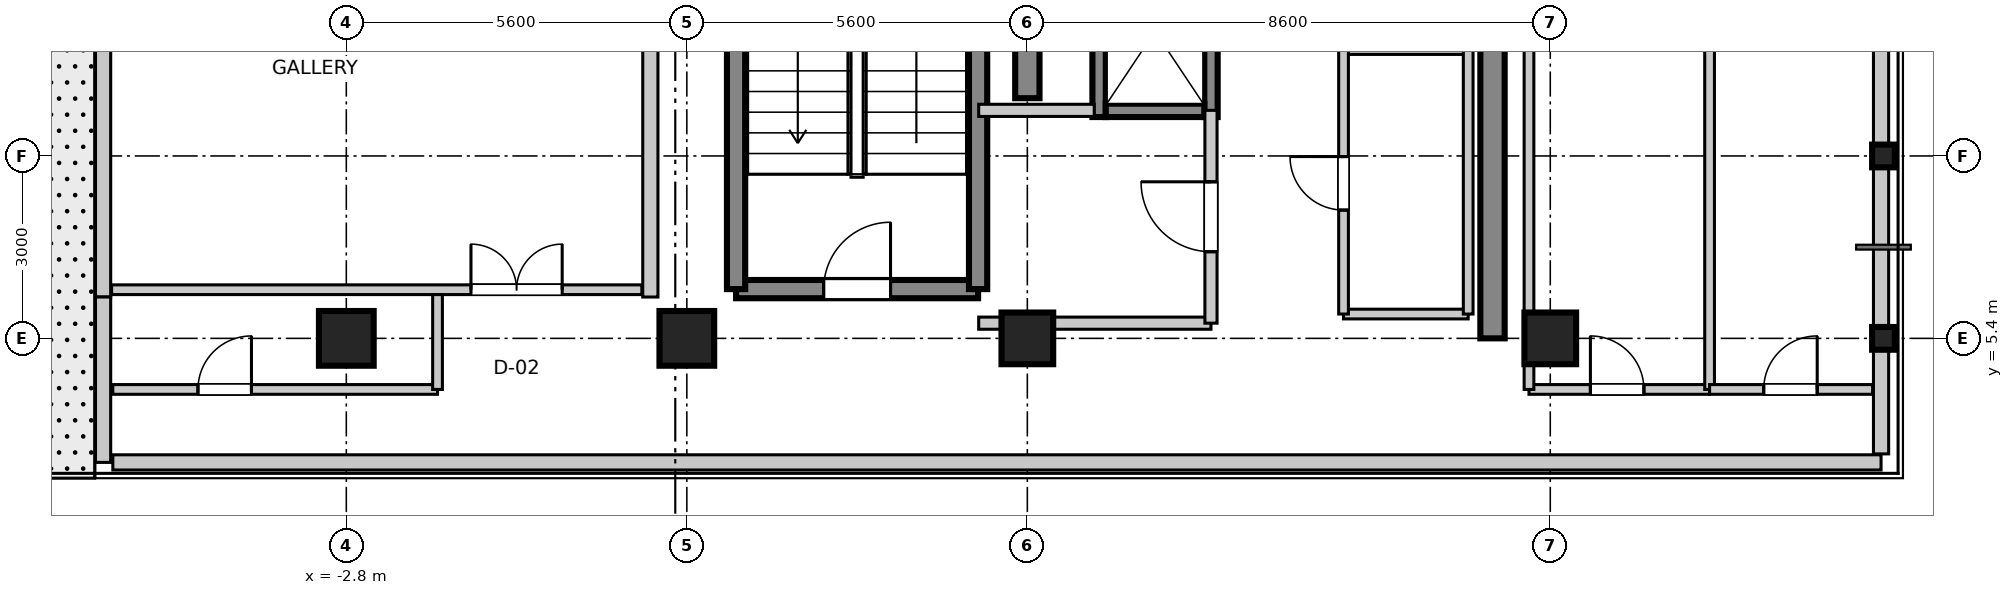
"""IFC4 building model, lengths in metres.
Left out: names, types, materials, properties, quantities, classifications, styles, units other than length and angle.
Written with IfcOpenShell. Run it as: python <this file> out.ifc"""

import sys

from ifc_helpers import new_model, si_unit, direction, frame, frame_2d, origin, origin_2d, place, context, subcontext, project, spatial, rectangle, i_section, extrude, source, transform, mapped, element, fill, save


model = new_model("IFC4")
c1 = context("Model", 3, precision=1e-05, world=origin(), true_north=direction((0.0, 1.0)))
c2 = subcontext(c1, "Body", "Model", "MODEL_VIEW")
j1 = project(units=[si_unit("LENGTHUNIT", "METRE"), si_unit("PLANEANGLEUNIT", "RADIAN")], contexts=[c1])
p1 = place(None, origin())
s1 = spatial("IfcSite", under=j1, at=p1, CompositionType="ELEMENT")
p2 = place(p1, origin())
s2 = spatial("IfcBuilding", under=s1, at=p2, CompositionType="ELEMENT")
p3 = place(p2, frame((0.0, 0.0, 300.35)))
s3 = spatial("IfcBuildingStorey", under=s2, at=p3, CompositionType="ELEMENT", Elevation=300.35)
m1 = source(origin(), c2, "Body", "SweptSolid", [
    extrude(rectangle(XDim=0.9, YDim=0.9, at=origin_2d()), origin(), (0.0, 0.0, 1.0), 3.805),
])
for number, where, z_axis, x_axis in (
    (1, (-2.8, 5.4, 0.0), (0.0, 0.0, 1.0), (1.0, 0.0, 0.0)),
    (2, (2.8, 5.4, 0.0), (0.0, 0.0, 1.0), (1.0, 0.0, 0.0)),
):
    element("IfcColumn", number, at=place(p3, frame(where, z_axis=z_axis, x_axis=x_axis)), inside=s3, PredefinedType="COLUMN", context=c2, shape_type="MappedRepresentation", body=[
        mapped(m1, transform((0.0, 0.0, 0.0), scale=1.0)),
    ])
m2 = source(origin(), c2, "Body", "SweptSolid", [
    extrude(rectangle(XDim=0.85, YDim=0.85, at=origin_2d()), origin(), (0.0, 0.0, 1.0), 3.805),
])
for number, where, z_axis, x_axis in (
    (3, (8.4, 5.4, 0.0), (0.0, 0.0, 1.0), (1.0, 0.0, 0.0)),
    (4, (17.0, 5.4, 0.0), (0.0, 0.0, 1.0), (1.0, 0.0, 0.0)),
):
    element("IfcColumn", number, at=place(p3, frame(where, z_axis=z_axis, x_axis=x_axis)), inside=s3, PredefinedType="PILASTER", context=c2, shape_type="MappedRepresentation", body=[
        mapped(m2, transform((0.0, 0.0, 0.0), scale=1.0)),
    ])
m3 = source(origin(), c2, "Body", "SweptSolid", [
    extrude(i_section(OverallWidth=0.374, OverallDepth=0.374, WebThickness=0.014, FlangeThickness=0.023, at=origin_2d()), origin(), (0.0, 0.0, 1.0), 3.805),
])
for number, where, z_axis, x_axis in (
    (5, (22.48, 5.4, 0.0), (0.0, 0.0, 1.0), (1.0, 0.0, 0.0)),
    (6, (22.48, 8.4, 0.0), (0.0, 0.0, 1.0), (1.0, 0.0, 0.0)),
):
    element("IfcColumn", number, at=place(p3, frame(where, z_axis=z_axis, x_axis=x_axis)), inside=s3, PredefinedType="COLUMN", context=c2, shape_type="MappedRepresentation", body=[
        mapped(m3, transform((0.0, 0.0, 0.0), scale=1.0)),
    ])
m4 = source(origin(), c2, "Body", "SweptSolid", [
    extrude(rectangle(XDim=7.65, YDim=0.4, at=frame_2d((3.825, 0.0))), origin(), (0.0, 0.0, 1.0), 3.55),
])
p4 = place(p3, frame((8.4, 9.35, 0.0), z_axis=(0.0, 0.0, 1.0), x_axis=(0.0, 1.0, 0.0)))
e7 = element("IfcWall", 7, at=p4, inside=s3, PredefinedType="SHEAR", context=c2, shape_type="MappedRepresentation", body=[
    mapped(m4, transform((0.0, 0.0, 0.0), scale=1.0)),
])
m5 = source(origin(), c2, "Body", "SweptSolid", [
    extrude(rectangle(XDim=11.6, YDim=0.4, at=frame_2d((5.8, 0.0))), origin(), (0.0, 0.0, 1.0), 3.55),
])
p5 = place(p3, frame((16.05, 5.4, 0.0), z_axis=(0.0, 0.0, 1.0), x_axis=(0.0, 1.0, 0.0)))
e8 = element("IfcWall", 8, at=p5, inside=s3, PredefinedType="SHEAR", context=c2, shape_type="MappedRepresentation", body=[
    mapped(m5, transform((0.0, 0.0, 0.0), scale=1.0)),
])
m6 = source(origin(), c2, "Body", "SweptSolid", [
    extrude(rectangle(XDim=3.98, YDim=0.3, at=frame_2d((1.99, 0.0))), origin(), (0.0, 0.0, 1.0), 3.55),
])
p6 = place(p3, frame((3.61, 6.21, 0.0), z_axis=(0.0, 0.0, 1.0), x_axis=(1.0, 0.0, 0.0)))
e9 = element("IfcWall", 9, at=p6, inside=s3, PredefinedType="SHEAR", context=c2, shape_type="MappedRepresentation", body=[
    mapped(m6, transform((0.0, 0.0, 0.0), scale=1.0)),
])
p7 = place(p6, frame((1.44, 0.0, 0.0)))
e10 = element("IfcOpeningElement", 10, at=p7, cuts=e9, PredefinedType="OPENING", context=c2, shape_type="SweptSolid", body=[
    extrude(rectangle(XDim=1.1, YDim=2.15, at=frame_2d((0.55, 1.075))), frame((0.0, 0.16, 0.0), z_axis=(0.0, -1.0, 0.0), x_axis=(1.0, 0.0, 0.0)), (0.0, 0.0, 1.0), 0.32),
])
m7 = source(origin(), c2, "Body", "SweptSolid", [
    extrude(rectangle(XDim=9.38, YDim=0.3, at=frame_2d((4.69, 0.0))), origin(), (0.0, 0.0, 1.0), 3.55),
])
for number, where, z_axis, x_axis in (
    (11, (3.61, 6.21, 0.0), (0.0, 0.0, 1.0), (0.0, 1.0, 0.0)),
    (12, (7.59, 6.21, 0.0), (0.0, 0.0, 1.0), (0.0, 1.0, 0.0)),
):
    element("IfcWall", number, at=place(p3, frame(where, z_axis=z_axis, x_axis=x_axis)), inside=s3, PredefinedType="SHEAR", context=c2, shape_type="MappedRepresentation", body=[
        mapped(m7, transform((0.0, 0.0, 0.0), scale=1.0)),
    ])
m8 = source(origin(), c2, "Body", "SweptSolid", [
    extrude(rectangle(XDim=2.82, YDim=0.22, at=frame_2d((1.41, 0.0))), origin(), (0.0, 0.0, 1.0), 3.55),
])
for number, where, z_axis, x_axis in (
    (13, (9.58, 9.04, 0.0), (0.0, 0.0, 1.0), (0.0, 1.0, 0.0)),
    (14, (11.42, 9.04, 0.0), (0.0, 0.0, 1.0), (0.0, 1.0, 0.0)),
):
    element("IfcWall", number, at=place(p3, frame(where, z_axis=z_axis, x_axis=x_axis)), inside=s3, PredefinedType="SHEAR", context=c2, shape_type="MappedRepresentation", body=[
        mapped(m8, transform((0.0, 0.0, 0.0), scale=1.0)),
    ])
m9 = source(origin(), c2, "Body", "SweptSolid", [
    extrude(rectangle(XDim=1.62, YDim=0.22, at=frame_2d((0.81, 0.0))), origin(), (0.0, 0.0, 1.0), 3.55),
])
p8 = place(p3, frame((9.69, 9.15, 0.0), z_axis=(0.0, 0.0, 1.0), x_axis=(1.0, 0.0, 0.0)))
e15 = element("IfcWall", 15, at=p8, inside=s3, PredefinedType="SHEAR", context=c2, shape_type="MappedRepresentation", body=[
    mapped(m9, transform((0.0, 0.0, 0.0), scale=1.0)),
])
m10 = source(origin(), c2, "Body", "SweptSolid", [
    extrude(rectangle(XDim=8.84, YDim=0.25, at=frame_2d((4.42, 0.0))), origin(), (0.0, 0.0, 1.0), 2.99),
])
for number, where, z_axis, x_axis in (
    (16, (-6.8, 6.08, 0.0), (0.0, 0.0, 1.0), (0.0, 1.0, 0.0)),
    (17, (2.2, 6.08, 0.0), (0.0, 0.0, 1.0), (0.0, 1.0, 0.0)),
):
    element("IfcWall", number, at=place(p3, frame(where, z_axis=z_axis, x_axis=x_axis)), inside=s3, PredefinedType="STANDARD", context=c2, shape_type="MappedRepresentation", body=[
        mapped(m10, transform((0.0, 0.0, 0.0), scale=1.0)),
    ])
m11 = source(origin(), c2, "Body", "SweptSolid", [
    extrude(rectangle(XDim=3.82, YDim=0.2, at=frame_2d((1.91, 0.0))), origin(), (0.0, 0.0, 1.0), 2.89),
])
p9 = place(p3, frame((7.6, 5.65, 0.0), z_axis=(0.0, 0.0, 1.0), x_axis=(1.0, 0.0, 0.0)))
e18 = element("IfcWall", 18, at=p9, inside=s3, PredefinedType="PARTITIONING", context=c2, shape_type="MappedRepresentation", body=[
    mapped(m11, transform((0.0, 0.0, 0.0), scale=1.0)),
])
m12 = source(origin(), c2, "Body", "SweptSolid", [
    extrude(rectangle(XDim=1.9, YDim=0.2, at=frame_2d((0.95, 0.0))), origin(), (0.0, 0.0, 1.0), 2.89),
])
p10 = place(p3, frame((7.6, 9.15, 0.0), z_axis=(0.0, 0.0, 1.0), x_axis=(1.0, 0.0, 0.0)))
e19 = element("IfcWall", 19, at=p10, inside=s3, PredefinedType="PARTITIONING", context=c2, shape_type="MappedRepresentation", body=[
    mapped(m12, transform((0.0, 0.0, 0.0), scale=1.0)),
])
m13 = source(origin(), c2, "Body", "SweptSolid", [
    extrude(rectangle(XDim=3.5, YDim=0.2, at=frame_2d((1.75, 0.0))), origin(), (0.0, 0.0, 1.0), 2.89),
])
p11 = place(p3, frame((11.42, 5.65, 0.0), z_axis=(0.0, 0.0, 1.0), x_axis=(0.0, 1.0, 0.0)))
e20 = element("IfcWall", 20, at=p11, inside=s3, PredefinedType="PARTITIONING", context=c2, shape_type="MappedRepresentation", body=[
    mapped(m13, transform((0.0, 0.0, 0.0), scale=1.0)),
])
p12 = place(p11, frame((1.175, 0.0, 0.0)))
e21 = element("IfcOpeningElement", 21, at=p12, cuts=e20, PredefinedType="OPENING", context=c2, shape_type="SweptSolid", body=[
    extrude(rectangle(XDim=1.15, YDim=2.15, at=frame_2d((0.575, 1.075))), frame((0.0, 0.11, 0.0), z_axis=(0.0, -1.0, 0.0), x_axis=(1.0, 0.0, 0.0)), (0.0, 0.0, 1.0), 0.22),
])
m14 = source(origin(), c2, "Body", "SweptSolid", [
    extrude(rectangle(XDim=29.08, YDim=0.25, at=frame_2d((14.54, 0.0))), origin(), (0.0, 0.0, 1.0), 2.89),
])
p13 = place(p3, frame((-6.64, 3.36, 0.0), z_axis=(0.0, 0.0, 1.0), x_axis=(1.0, 0.0, 0.0)))
e22 = element("IfcWall", 22, at=p13, inside=s3, PredefinedType="STANDARD", context=c2, shape_type="MappedRepresentation", body=[
    mapped(m14, transform((0.0, 0.0, 0.0), scale=1.0)),
])
m15 = source(origin(), c2, "Body", "SweptSolid", [
    extrude(rectangle(XDim=2.72, YDim=0.25, at=frame_2d((1.36, 0.0))), origin(), (0.0, 0.0, 1.0), 2.89),
])
p14 = place(p3, frame((-6.8, 3.36, 0.0), z_axis=(0.0, 0.0, 1.0), x_axis=(0.0, 1.0, 0.0)))
e23 = element("IfcWall", 23, at=p14, inside=s3, PredefinedType="STANDARD", context=c2, shape_type="MappedRepresentation", body=[
    mapped(m15, transform((0.0, 0.0, 0.0), scale=1.0)),
])
m16 = source(origin(), c2, "Body", "SweptSolid", [
    extrude(rectangle(XDim=16.12, YDim=0.25, at=frame_2d((8.06, 0.0))), origin(), (0.0, 0.0, 1.0), 2.89),
])
p15 = place(p3, frame((22.44, 3.5, 0.0), z_axis=(0.0, 0.0, 1.0), x_axis=(0.0, 1.0, 0.0)))
e24 = element("IfcWall", 24, at=p15, inside=s3, PredefinedType="STANDARD", context=c2, shape_type="MappedRepresentation", body=[
    mapped(m16, transform((0.0, 0.0, 0.0), scale=1.0)),
])
m17 = source(origin(), c2, "Body", "SweptSolid", [
    extrude(rectangle(XDim=2.05, YDim=0.16, at=frame_2d((1.025, 0.0))), origin(), (0.0, 0.0, 1.0), 2.89),
])
for number, where, z_axis, x_axis in (
    (25, (13.6, 5.8, 0.0), (0.0, 0.0, 1.0), (1.0, 0.0, 0.0)),
    (26, (13.6, 10.15, 0.0), (0.0, 0.0, 1.0), (1.0, 0.0, 0.0)),
):
    element("IfcWall", number, at=place(p3, frame(where, z_axis=z_axis, x_axis=x_axis)), inside=s3, PredefinedType="PARTITIONING", context=c2, shape_type="MappedRepresentation", body=[
        mapped(m17, transform((0.0, 0.0, 0.0), scale=1.0)),
    ])
m18 = source(origin(), c2, "Body", "SweptSolid", [
    extrude(rectangle(XDim=4.35, YDim=0.16, at=frame_2d((2.175, 0.0))), origin(), (0.0, 0.0, 1.0), 2.89),
])
p16 = place(p3, frame((13.6, 5.8, 0.0), z_axis=(0.0, 0.0, 1.0), x_axis=(0.0, 1.0, 0.0)))
e27 = element("IfcWall", 27, at=p16, inside=s3, PredefinedType="PARTITIONING", context=c2, shape_type="MappedRepresentation", body=[
    mapped(m18, transform((0.0, 0.0, 0.0), scale=1.0)),
])
p17 = place(p16, frame((1.71, 0.0, 0.0)))
e28 = element("IfcOpeningElement", 28, at=p17, cuts=e27, PredefinedType="OPENING", context=c2, shape_type="SweptSolid", body=[
    extrude(rectangle(XDim=0.88, YDim=2.1, at=frame_2d((0.44, 1.05))), frame((0.0, 0.09, 0.0), z_axis=(0.0, -1.0, 0.0), x_axis=(1.0, 0.0, 0.0)), (0.0, 0.0, 1.0), 0.18),
])
p18 = place(p3, frame((15.65, 5.8, 0.0), z_axis=(0.0, 0.0, 1.0), x_axis=(0.0, 1.0, 0.0)))
e29 = element("IfcWall", 29, at=p18, inside=s3, PredefinedType="PARTITIONING", context=c2, shape_type="MappedRepresentation", body=[
    mapped(m18, transform((0.0, 0.0, 0.0), scale=1.0)),
])
m19 = source(origin(), c2, "Body", "SweptSolid", [
    extrude(rectangle(XDim=8.72, YDim=0.16, at=frame_2d((4.36, 0.0))), origin(), (0.0, 0.0, 1.0), 2.89),
])
p19 = place(p3, frame((-6.66, 6.2, 0.0), z_axis=(0.0, 0.0, 1.0), x_axis=(1.0, 0.0, 0.0)))
e30 = element("IfcWall", 30, at=p19, inside=s3, PredefinedType="PARTITIONING", context=c2, shape_type="MappedRepresentation", body=[
    mapped(m19, transform((0.0, 0.0, 0.0), scale=1.0)),
])
p20 = place(p19, frame((5.91, 0.0, 0.0)))
e31 = element("IfcOpeningElement", 31, at=p20, cuts=e30, PredefinedType="OPENING", context=c2, shape_type="SweptSolid", body=[
    extrude(rectangle(XDim=1.5, YDim=2.15, at=frame_2d((0.75, 1.075))), frame((0.0, 0.09, 0.0), z_axis=(0.0, -1.0, 0.0), x_axis=(1.0, 0.0, 0.0)), (0.0, 0.0, 1.0), 0.18),
])
m20 = source(origin(), c2, "Body", "SweptSolid", [
    extrude(rectangle(XDim=5.34, YDim=0.16, at=frame_2d((2.67, 0.0))), origin(), (0.0, 0.0, 1.0), 2.89),
])
p21 = place(p3, frame((-6.64, 4.56, 0.0), z_axis=(0.0, 0.0, 1.0), x_axis=(1.0, 0.0, 0.0)))
e32 = element("IfcWall", 32, at=p21, inside=s3, PredefinedType="PARTITIONING", context=c2, shape_type="MappedRepresentation", body=[
    mapped(m20, transform((0.0, 0.0, 0.0), scale=1.0)),
])
p22 = place(p21, frame((1.4, 0.0, 0.0)))
e33 = element("IfcOpeningElement", 33, at=p22, cuts=e32, PredefinedType="OPENING", context=c2, shape_type="SweptSolid", body=[
    extrude(rectangle(XDim=0.88, YDim=2.1, at=frame_2d((0.44, 1.05))), frame((0.0, 0.09, 0.0), z_axis=(0.0, -1.0, 0.0), x_axis=(1.0, 0.0, 0.0)), (0.0, 0.0, 1.0), 0.18),
])
m21 = source(origin(), c2, "Body", "SweptSolid", [
    extrude(rectangle(XDim=1.56, YDim=0.16, at=frame_2d((0.78, 0.0))), origin(), (0.0, 0.0, 1.0), 2.89),
])
p23 = place(p3, frame((-1.3, 4.56, 0.0), z_axis=(0.0, 0.0, 1.0), x_axis=(0.0, 1.0, 0.0)))
e34 = element("IfcWall", 34, at=p23, inside=s3, PredefinedType="PARTITIONING", context=c2, shape_type="MappedRepresentation", body=[
    mapped(m21, transform((0.0, 0.0, 0.0), scale=1.0)),
])
m22 = source(origin(), c2, "Body", "SweptSolid", [
    extrude(rectangle(XDim=2.97, YDim=0.16, at=frame_2d((1.485, 0.0))), origin(), (0.0, 0.0, 1.0), 2.89),
])
p24 = place(p3, frame((16.65, 4.56, 0.0), z_axis=(0.0, 0.0, 1.0), x_axis=(1.0, 0.0, 0.0)))
e35 = element("IfcWall", 35, at=p24, inside=s3, PredefinedType="PARTITIONING", context=c2, shape_type="MappedRepresentation", body=[
    mapped(m22, transform((0.0, 0.0, 0.0), scale=1.0)),
])
p25 = place(p24, frame((1.01, 0.0, 0.0)))
e36 = element("IfcOpeningElement", 36, at=p25, cuts=e35, PredefinedType="OPENING", context=c2, shape_type="SweptSolid", body=[
    extrude(rectangle(XDim=0.88, YDim=2.1, at=frame_2d((0.44, 1.05))), frame((0.0, 0.09, 0.0), z_axis=(0.0, -1.0, 0.0), x_axis=(1.0, 0.0, 0.0)), (0.0, 0.0, 1.0), 0.18),
])
m23 = source(origin(), c2, "Body", "SweptSolid", [
    extrude(rectangle(XDim=17.74, YDim=0.16, at=frame_2d((8.87, 0.0))), origin(), (0.0, 0.0, 1.0), 2.89),
])
for number, where, z_axis, x_axis in (
    (37, (16.65, 4.56, 0.0), (0.0, 0.0, 1.0), (0.0, 1.0, 0.0)),
    (38, (19.62, 4.56, 0.0), (0.0, 0.0, 1.0), (0.0, 1.0, 0.0)),
):
    element("IfcWall", number, at=place(p3, frame(where, z_axis=z_axis, x_axis=x_axis)), inside=s3, PredefinedType="PARTITIONING", context=c2, shape_type="MappedRepresentation", body=[
        mapped(m23, transform((0.0, 0.0, 0.0), scale=1.0)),
    ])
m24 = source(origin(), c2, "Body", "SweptSolid", [
    extrude(rectangle(XDim=2.68, YDim=0.16, at=frame_2d((1.34, 0.0))), origin(), (0.0, 0.0, 1.0), 2.89),
])
p26 = place(p3, frame((19.62, 4.56, 0.0), z_axis=(0.0, 0.0, 1.0), x_axis=(1.0, 0.0, 0.0)))
e39 = element("IfcWall", 39, at=p26, inside=s3, PredefinedType="PARTITIONING", context=c2, shape_type="MappedRepresentation", body=[
    mapped(m24, transform((0.0, 0.0, 0.0), scale=1.0)),
])
p27 = place(p26, frame((0.89, 0.0, 0.0)))
e40 = element("IfcOpeningElement", 40, at=p27, cuts=e39, PredefinedType="OPENING", context=c2, shape_type="SweptSolid", body=[
    extrude(rectangle(XDim=0.88, YDim=2.1, at=frame_2d((0.44, 1.05))), frame((0.0, 0.09, 0.0), z_axis=(0.0, -1.0, 0.0), x_axis=(1.0, 0.0, 0.0)), (0.0, 0.0, 1.0), 0.18),
])
m25 = source(origin(), c2, "Body", "SweptSolid", [
    extrude(rectangle(XDim=1.1, YDim=2.15, at=frame_2d((0.55, 1.075))), frame((0.0, 0.025, 0.0), z_axis=(0.0, -1.0, 0.0), x_axis=(1.0, 0.0, 0.0)), (0.0, 0.0, 1.0), 0.05),
])
p28 = place(p7, origin())
e41 = element("IfcDoor", 41, at=p28, inside=s3, OperationType="SINGLE_SWING_RIGHT", PredefinedType="DOOR", context=c2, shape_type="MappedRepresentation", body=[
    mapped(m25, transform((0.0, 0.0, 0.0), scale=1.0)),
])
fill(e10, e41)
m26 = source(origin(), c2, "Body", "SweptSolid", [
    extrude(rectangle(XDim=1.15, YDim=2.15, at=frame_2d((0.575, 1.075))), frame((0.0, 0.025, 0.0), z_axis=(0.0, -1.0, 0.0), x_axis=(1.0, 0.0, 0.0)), (0.0, 0.0, 1.0), 0.05),
])
p29 = place(p12, frame((1.15, 0.0, 0.0), z_axis=(0.0, 0.0, 1.0), x_axis=(-1.0, 0.0, 0.0)))
e42 = element("IfcDoor", 42, at=p29, inside=s3, OperationType="SINGLE_SWING_RIGHT", PredefinedType="DOOR", context=c2, shape_type="MappedRepresentation", body=[
    mapped(m26, transform((0.0, 0.0, 0.0), scale=1.0)),
])
fill(e21, e42)
m27 = source(origin(), c2, "Body", "SweptSolid", [
    extrude(rectangle(XDim=0.88, YDim=2.1, at=frame_2d((0.44, 1.05))), frame((0.0, 0.025, 0.0), z_axis=(0.0, -1.0, 0.0), x_axis=(1.0, 0.0, 0.0)), (0.0, 0.0, 1.0), 0.05),
])
p30 = place(p17, frame((0.88, 0.0, 0.0), z_axis=(0.0, 0.0, 1.0), x_axis=(-1.0, 0.0, 0.0)))
e43 = element("IfcDoor", 43, at=p30, inside=s3, OperationType="SINGLE_SWING_RIGHT", PredefinedType="DOOR", context=c2, shape_type="MappedRepresentation", body=[
    mapped(m27, transform((0.0, 0.0, 0.0), scale=1.0)),
])
fill(e28, e43)
m28 = source(origin(), c2, "Body", "SweptSolid", [
    extrude(rectangle(XDim=1.5, YDim=2.15, at=frame_2d((0.75, 1.075))), frame((0.0, 0.025, 0.0), z_axis=(0.0, -1.0, 0.0), x_axis=(1.0, 0.0, 0.0)), (0.0, 0.0, 1.0), 0.05),
])
p31 = place(p20, origin())
e44 = element("IfcDoor", 44, at=p31, inside=s3, OperationType="DOUBLE_DOOR_SINGLE_SWING", PredefinedType="DOOR", context=c2, shape_type="MappedRepresentation", body=[
    mapped(m28, transform((0.0, 0.0, 0.0), scale=1.0)),
])
fill(e31, e44)
p32 = place(p22, origin())
e45 = element("IfcDoor", 45, at=p32, inside=s3, OperationType="SINGLE_SWING_RIGHT", PredefinedType="DOOR", context=c2, shape_type="MappedRepresentation", body=[
    mapped(m27, transform((0.0, 0.0, 0.0), scale=1.0)),
])
fill(e33, e45)
p33 = place(p25, origin())
e46 = element("IfcDoor", 46, at=p33, inside=s3, OperationType="SINGLE_SWING_LEFT", PredefinedType="DOOR", context=c2, shape_type="MappedRepresentation", body=[
    mapped(m27, transform((0.0, 0.0, 0.0), scale=1.0)),
])
fill(e36, e46)
p34 = place(p27, origin())
e47 = element("IfcDoor", 47, at=p34, inside=s3, OperationType="SINGLE_SWING_RIGHT", PredefinedType="DOOR", context=c2, shape_type="MappedRepresentation", body=[
    mapped(m27, transform((0.0, 0.0, 0.0), scale=1.0)),
])
fill(e40, e47)
save(model, sys.argv[1])
